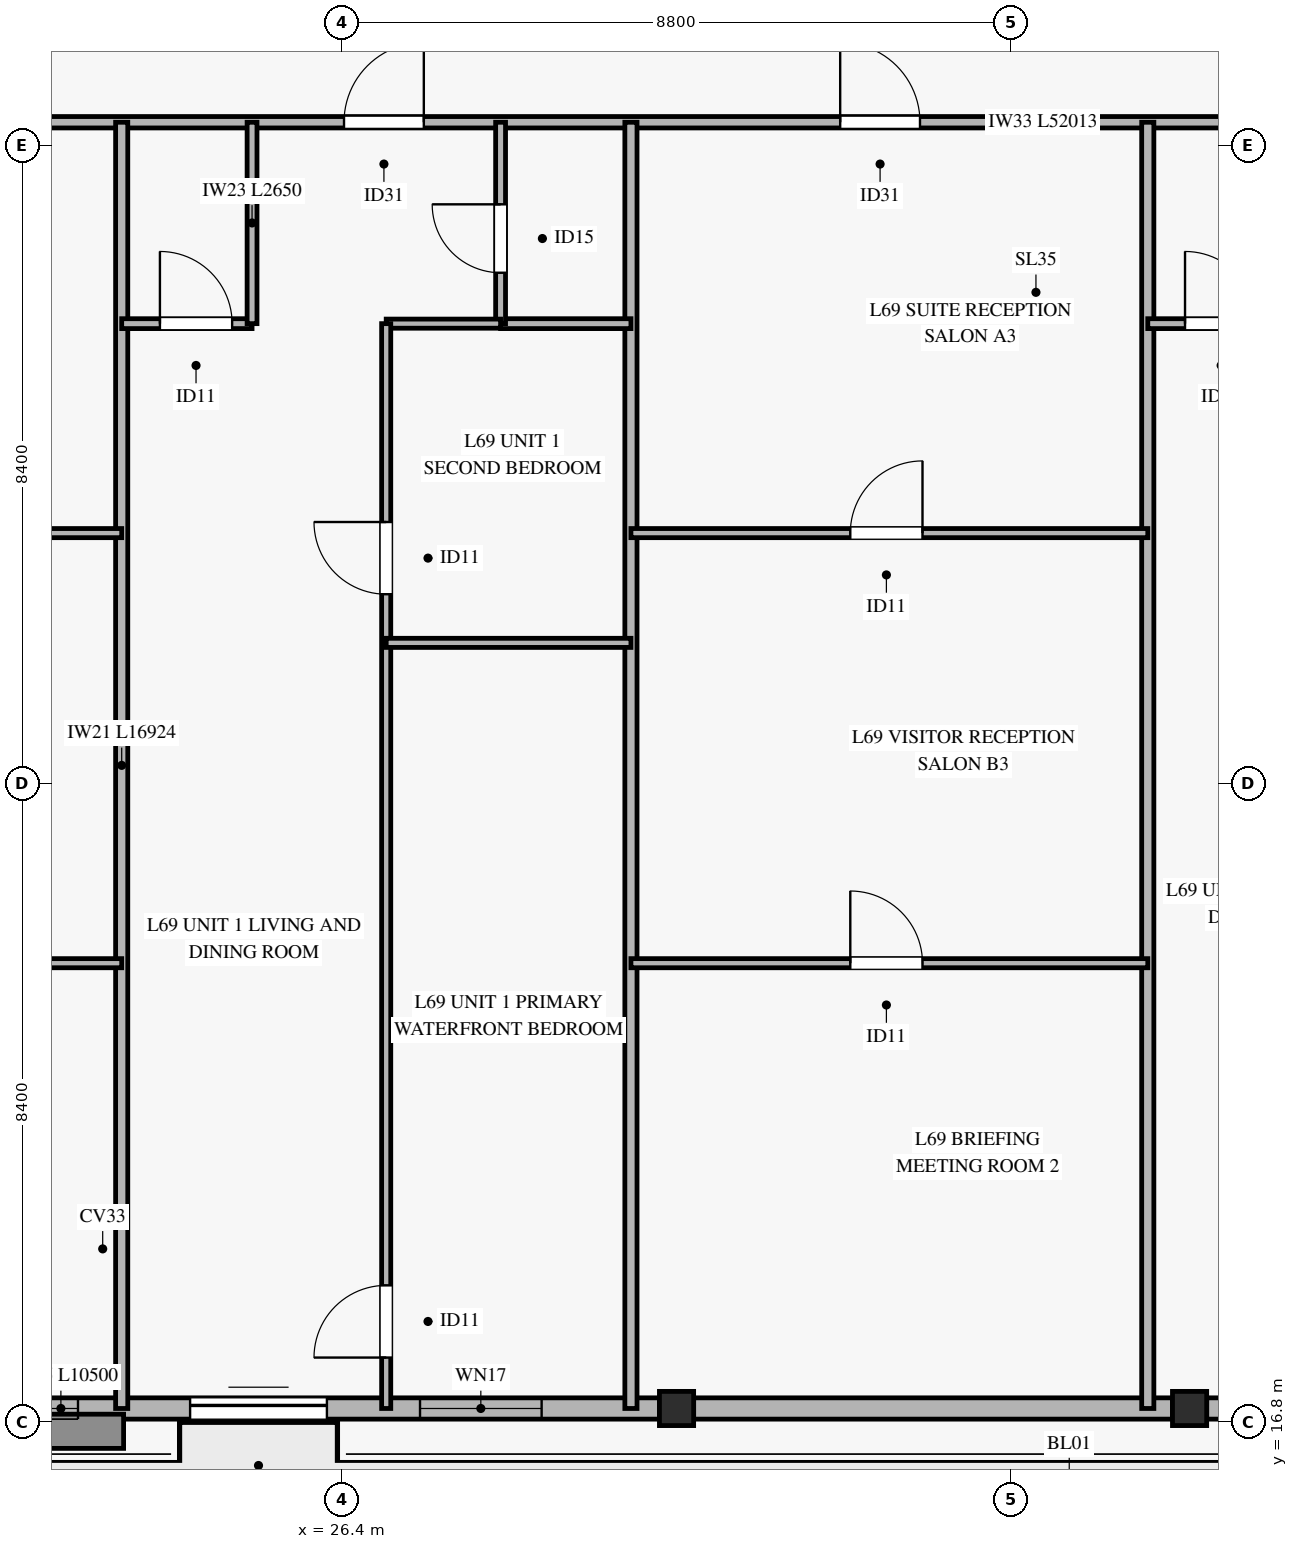
"""IFC4 building model, lengths in metres.
Left out: names, types, materials, properties, quantities, classifications, styles, units other than length and angle.
Written with IfcOpenShell. Run it as: python <this file> out.ifc"""

import sys

from ifc_helpers import new_model, si_unit, direction, frame, frame_2d, origin, origin_2d, place, context, subcontext, project, spatial, rectangle, hollow_rectangle, extrude, source, transform, mapped, element, fill, save


model = new_model("IFC4")
c1 = context("Model", 3, precision=1e-05, world=origin(), true_north=direction((0.0, 1.0)))
c2 = subcontext(c1, "Body", "Model", "MODEL_VIEW")
j1 = project(units=[si_unit("LENGTHUNIT", "METRE"), si_unit("PLANEANGLEUNIT", "RADIAN")], contexts=[c1])
p1 = place(None, origin())
s1 = spatial("IfcSite", under=j1, at=p1, CompositionType="ELEMENT")
p2 = place(p1, origin())
s2 = spatial("IfcBuilding", under=s1, at=p2, CompositionType="ELEMENT")
p3 = place(p2, frame((0.0, 0.0, 268.9)))
s3 = spatial("IfcBuildingStorey", under=s2, at=p3, CompositionType="ELEMENT", Elevation=268.9)
m1 = source(origin(), c2, "Body", "SweptSolid", [
    extrude(hollow_rectangle(XDim=0.45, YDim=0.45, WallThickness=0.022, at=origin_2d()), origin(), (0.0, 0.0, 1.0), 3.185),
])
for number, where, z_axis, x_axis in (
    (1, (30.8, 16.976, 0.0), (0.0, 0.0, 1.0), (1.0, 0.0, 0.0)),
    (2, (37.55, 16.976, 0.0), (0.0, 0.0, 1.0), (1.0, 0.0, 0.0)),
):
    element("IfcColumn", number, at=place(p3, frame(where, z_axis=z_axis, x_axis=x_axis)), inside=s3, PredefinedType="COLUMN", context=c2, shape_type="MappedRepresentation", body=[
        mapped(m1, transform((0.0, 0.0, 0.0), x_axis=(1.0, 0.0, 0.0), y_axis=(0.0, 1.0, 0.0), z_axis=(0.0, 0.0, 1.0), scale=1.0)),
    ])
p4 = place(p3, frame((20.075, 16.976, 0.0), z_axis=(0.0, 0.0, 1.0), x_axis=(1.0, 0.0, 0.0)))
e3 = element("IfcWall", 3, at=p4, inside=s3, PredefinedType="SOLIDWALL", context=c2, shape_type="SweptSolid", body=[
    extrude(rectangle(XDim=10.5, YDim=0.28, at=frame_2d((5.25, 0.0))), origin(), (0.0, 0.0, 1.0), 2.815),
])
p5 = place(p4, frame((4.325, 0.0, 0.0)))
e4 = element("IfcOpeningElement", 4, at=p5, cuts=e3, PredefinedType="OPENING", context=c2, shape_type="SweptSolid", body=[
    extrude(rectangle(XDim=1.8, YDim=2.25, at=frame_2d((0.9, 1.125))), frame((0.0, 0.15, 0.0), z_axis=(0.0, -1.0, 0.0), x_axis=(1.0, 0.0, 0.0)), (0.0, 0.0, 1.0), 0.3),
])
p6 = place(p4, frame((0.65, 0.0, 0.45)))
e5 = element("IfcOpeningElement", 5, at=p6, cuts=e3, PredefinedType="OPENING", context=c2, shape_type="SweptSolid", body=[
    extrude(rectangle(XDim=2.2, YDim=2.1, at=frame_2d((1.1, 1.05))), frame((0.0, 0.15, 0.0), z_axis=(0.0, -1.0, 0.0), x_axis=(1.0, 0.0, 0.0)), (0.0, 0.0, 1.0), 0.3),
])
p7 = place(p4, frame((7.35, 0.0, 0.45)))
e6 = element("IfcOpeningElement", 6, at=p7, cuts=e3, PredefinedType="OPENING", context=c2, shape_type="SweptSolid", body=[
    extrude(rectangle(XDim=1.6, YDim=2.0, at=frame_2d((0.8, 1.0))), frame((0.0, 0.15, 0.0), z_axis=(0.0, -1.0, 0.0), x_axis=(1.0, 0.0, 0.0)), (0.0, 0.0, 1.0), 0.3),
])
for number, where, z_axis, x_axis in (
    (7, (31.025, 16.976, 0.0), (0.0, 0.0, 1.0), (1.0, 0.0, 0.0)),
    (8, (37.775, 16.976, 0.0), (0.0, 0.0, 1.0), (1.0, 0.0, 0.0)),
):
    element("IfcWall", number, at=place(p3, frame(where, z_axis=z_axis, x_axis=x_axis)), inside=s3, PredefinedType="SOLIDWALL", context=c2, shape_type="SweptSolid", body=[
        extrude(rectangle(XDim=6.3, YDim=0.28, at=frame_2d((3.15, 0.0))), origin(), (0.0, 0.0, 1.0), 2.815),
    ])
p8 = place(p3, frame((9.194, 33.9, 0.0), z_axis=(0.0, 0.0, 1.0), x_axis=(1.0, 0.0, 0.0)))
e9 = element("IfcWall", 9, at=p8, inside=s3, PredefinedType="PARTITIONING", context=c2, shape_type="SweptSolid", body=[
    extrude(rectangle(XDim=52.013, YDim=0.15, at=frame_2d((26.006, 0.0))), origin(), (0.0, 0.0, 1.0), 2.47),
])
p9 = place(p8, frame((5.729, 0.0, 0.0)))
e10 = element("IfcOpeningElement", 10, at=p9, cuts=e9, PredefinedType="OPENING", context=c2, shape_type="SweptSolid", body=[
    extrude(rectangle(XDim=1.05, YDim=2.15, at=frame_2d((0.525, 1.075))), frame((0.0, 0.085, 0.0), z_axis=(0.0, -1.0, 0.0), x_axis=(1.0, 0.0, 0.0)), (0.0, 0.0, 1.0), 0.17),
])
p10 = place(p8, frame((17.231, 0.0, 0.0)))
e11 = element("IfcOpeningElement", 11, at=p10, cuts=e9, PredefinedType="OPENING", context=c2, shape_type="SweptSolid", body=[
    extrude(rectangle(XDim=1.05, YDim=2.15, at=frame_2d((0.525, 1.075))), frame((0.0, 0.085, 0.0), z_axis=(0.0, -1.0, 0.0), x_axis=(1.0, 0.0, 0.0)), (0.0, 0.0, 1.0), 0.17),
])
p11 = place(p8, frame((23.759, 0.0, 0.0)))
e12 = element("IfcOpeningElement", 12, at=p11, cuts=e9, PredefinedType="OPENING", context=c2, shape_type="SweptSolid", body=[
    extrude(rectangle(XDim=1.05, YDim=2.15, at=frame_2d((0.525, 1.075))), frame((0.0, 0.085, 0.0), z_axis=(0.0, -1.0, 0.0), x_axis=(1.0, 0.0, 0.0)), (0.0, 0.0, 1.0), 0.17),
])
p12 = place(p8, frame((30.681, 0.0, 0.0)))
e13 = element("IfcOpeningElement", 13, at=p12, cuts=e9, PredefinedType="OPENING", context=c2, shape_type="SweptSolid", body=[
    extrude(rectangle(XDim=1.05, YDim=2.15, at=frame_2d((0.525, 1.075))), frame((0.0, 0.085, 0.0), z_axis=(0.0, -1.0, 0.0), x_axis=(1.0, 0.0, 0.0)), (0.0, 0.0, 1.0), 0.17),
])
p13 = place(p8, frame((36.826, 0.0, 0.0)))
e14 = element("IfcOpeningElement", 14, at=p13, cuts=e9, PredefinedType="OPENING", context=c2, shape_type="SweptSolid", body=[
    extrude(rectangle(XDim=1.05, YDim=2.15, at=frame_2d((0.525, 1.075))), frame((0.0, 0.085, 0.0), z_axis=(0.0, -1.0, 0.0), x_axis=(1.0, 0.0, 0.0)), (0.0, 0.0, 1.0), 0.17),
])
p14 = place(p8, frame((44.786, 0.0, 0.0)))
e15 = element("IfcOpeningElement", 15, at=p14, cuts=e9, PredefinedType="OPENING", context=c2, shape_type="SweptSolid", body=[
    extrude(rectangle(XDim=1.05, YDim=2.15, at=frame_2d((0.525, 1.075))), frame((0.0, 0.085, 0.0), z_axis=(0.0, -1.0, 0.0), x_axis=(1.0, 0.0, 0.0)), (0.0, 0.0, 1.0), 0.17),
])
for number, where, z_axis, x_axis in (
    (16, (23.5, 16.976, 0.0), (0.0, 0.0, 1.0), (0.0, 1.0, 0.0)),
    (17, (30.2, 16.976, 0.0), (0.0, 0.0, 1.0), (0.0, 1.0, 0.0)),
    (18, (37.0, 16.976, 0.0), (0.0, 0.0, 1.0), (0.0, 1.0, 0.0)),
):
    element("IfcWall", number, at=place(p3, frame(where, z_axis=z_axis, x_axis=x_axis)), inside=s3, PredefinedType="PARTITIONING", context=c2, shape_type="SweptSolid", body=[
        extrude(rectangle(XDim=16.924, YDim=0.16, at=frame_2d((8.462, 0.0))), origin(), (0.0, 0.0, 1.0), 2.77),
    ])
p15 = place(p3, frame((9.194, 22.835, 0.0), z_axis=(0.0, 0.0, 1.0), x_axis=(1.0, 0.0, 0.0)))
e19 = element("IfcWall", 19, at=p15, inside=s3, PredefinedType="PARTITIONING", context=c2, shape_type="SweptSolid", body=[
    extrude(rectangle(XDim=14.306, YDim=0.12, at=frame_2d((7.153, 0.0))), origin(), (0.0, 0.0, 1.0), 2.47),
])
p16 = place(p15, frame((6.008, 0.0, 0.0)))
e20 = element("IfcOpeningElement", 20, at=p16, cuts=e19, PredefinedType="OPENING", context=c2, shape_type="SweptSolid", body=[
    extrude(rectangle(XDim=0.95, YDim=2.1, at=frame_2d((0.475, 1.05))), frame((0.0, 0.07, 0.0), z_axis=(0.0, -1.0, 0.0), x_axis=(1.0, 0.0, 0.0)), (0.0, 0.0, 1.0), 0.14),
])
p17 = place(p3, frame((9.194, 28.494, 0.0), z_axis=(0.0, 0.0, 1.0), x_axis=(1.0, 0.0, 0.0)))
e21 = element("IfcWall", 21, at=p17, inside=s3, PredefinedType="PARTITIONING", context=c2, shape_type="SweptSolid", body=[
    extrude(rectangle(XDim=14.306, YDim=0.12, at=frame_2d((7.153, 0.0))), origin(), (0.0, 0.0, 1.0), 2.47),
])
p18 = place(p17, frame((6.008, 0.0, 0.0)))
e22 = element("IfcOpeningElement", 22, at=p18, cuts=e21, PredefinedType="OPENING", context=c2, shape_type="SweptSolid", body=[
    extrude(rectangle(XDim=0.95, YDim=2.1, at=frame_2d((0.475, 1.05))), frame((0.0, 0.07, 0.0), z_axis=(0.0, -1.0, 0.0), x_axis=(1.0, 0.0, 0.0)), (0.0, 0.0, 1.0), 0.14),
])
p19 = place(p3, frame((23.5, 31.25, 0.0), z_axis=(0.0, 0.0, 1.0), x_axis=(1.0, 0.0, 0.0)))
e23 = element("IfcWall", 23, at=p19, inside=s3, PredefinedType="PARTITIONING", context=c2, shape_type="SweptSolid", body=[
    extrude(rectangle(XDim=1.715, YDim=0.13, at=frame_2d((0.857, 0.0))), origin(), (0.0, 0.0, 1.0), 3.185),
])
p20 = place(p19, frame((0.503, 0.0, 0.0)))
e24 = element("IfcOpeningElement", 24, at=p20, cuts=e23, PredefinedType="OPENING", context=c2, shape_type="SweptSolid", body=[
    extrude(rectangle(XDim=0.95, YDim=2.1, at=frame_2d((0.475, 1.05))), frame((0.0, 0.075, 0.0), z_axis=(0.0, -1.0, 0.0), x_axis=(1.0, 0.0, 0.0)), (0.0, 0.0, 1.0), 0.15),
])
p21 = place(p3, frame((25.215, 31.25, 0.0), z_axis=(0.0, 0.0, 1.0), x_axis=(0.0, 1.0, 0.0)))
e25 = element("IfcWall", 25, at=p21, inside=s3, PredefinedType="PARTITIONING", context=c2, shape_type="SweptSolid", body=[
    extrude(rectangle(XDim=2.65, YDim=0.13, at=frame_2d((1.325, 0.0))), origin(), (0.0, 0.0, 1.0), 2.77),
])
p22 = place(p3, frame((28.485, 31.25, 0.0), z_axis=(0.0, 0.0, 1.0), x_axis=(1.0, 0.0, 0.0)))
e26 = element("IfcWall", 26, at=p22, inside=s3, PredefinedType="PARTITIONING", context=c2, shape_type="SweptSolid", body=[
    extrude(rectangle(XDim=1.715, YDim=0.13, at=frame_2d((0.857, 0.0))), origin(), (0.0, 0.0, 1.0), 3.185),
])
p23 = place(p3, frame((28.485, 31.25, 0.0), z_axis=(0.0, 0.0, 1.0), x_axis=(0.0, 1.0, 0.0)))
e27 = element("IfcWall", 27, at=p23, inside=s3, PredefinedType="PARTITIONING", context=c2, shape_type="SweptSolid", body=[
    extrude(rectangle(XDim=2.65, YDim=0.13, at=frame_2d((1.325, 0.0))), origin(), (0.0, 0.0, 1.0), 2.77),
])
p24 = place(p23, frame((0.67, 0.0, 0.0)))
e28 = element("IfcOpeningElement", 28, at=p24, cuts=e27, PredefinedType="OPENING", context=c2, shape_type="SweptSolid", body=[
    extrude(rectangle(XDim=0.9, YDim=2.1, at=frame_2d((0.45, 1.05))), frame((0.0, 0.075, 0.0), z_axis=(0.0, -1.0, 0.0), x_axis=(1.0, 0.0, 0.0)), (0.0, 0.0, 1.0), 0.15),
])
p25 = place(p3, frame((26.98, 31.25, 0.0), z_axis=(0.0, 0.0, 1.0), x_axis=(1.0, 0.0, 0.0)))
e29 = element("IfcWall", 29, at=p25, inside=s3, PredefinedType="PARTITIONING", context=c2, shape_type="SweptSolid", body=[
    extrude(rectangle(XDim=1.505, YDim=0.12, at=frame_2d((0.752, 0.0))), origin(), (0.0, 0.0, 1.0), 3.185),
])
p26 = place(p3, frame((26.98, 16.976, 0.0), z_axis=(0.0, 0.0, 1.0), x_axis=(0.0, 1.0, 0.0)))
e30 = element("IfcWall", 30, at=p26, inside=s3, PredefinedType="PARTITIONING", context=c2, shape_type="SweptSolid", body=[
    extrude(rectangle(XDim=14.274, YDim=0.12, at=frame_2d((7.137, 0.0))), origin(), (0.0, 0.0, 1.0), 2.77),
])
p27 = place(p26, frame((0.67, 0.0, 0.0)))
e31 = element("IfcOpeningElement", 31, at=p27, cuts=e30, PredefinedType="OPENING", context=c2, shape_type="SweptSolid", body=[
    extrude(rectangle(XDim=0.95, YDim=2.1, at=frame_2d((0.475, 1.05))), frame((0.0, 0.07, 0.0), z_axis=(0.0, -1.0, 0.0), x_axis=(1.0, 0.0, 0.0)), (0.0, 0.0, 1.0), 0.14),
])
p28 = place(p26, frame((10.714, 0.0, 0.0)))
e32 = element("IfcOpeningElement", 32, at=p28, cuts=e30, PredefinedType="OPENING", context=c2, shape_type="SweptSolid", body=[
    extrude(rectangle(XDim=0.95, YDim=2.1, at=frame_2d((0.475, 1.05))), frame((0.0, 0.07, 0.0), z_axis=(0.0, -1.0, 0.0), x_axis=(1.0, 0.0, 0.0)), (0.0, 0.0, 1.0), 0.14),
])
p29 = place(p3, frame((26.98, 27.05, 0.0), z_axis=(0.0, 0.0, 1.0), x_axis=(1.0, 0.0, 0.0)))
e33 = element("IfcWall", 33, at=p29, inside=s3, PredefinedType="PARTITIONING", context=c2, shape_type="SweptSolid", body=[
    extrude(rectangle(XDim=3.22, YDim=0.12, at=frame_2d((1.61, 0.0))), origin(), (0.0, 0.0, 1.0), 2.77),
])
p30 = place(p3, frame((30.2, 22.835, 0.0), z_axis=(0.0, 0.0, 1.0), x_axis=(1.0, 0.0, 0.0)))
e34 = element("IfcWall", 34, at=p30, inside=s3, PredefinedType="PARTITIONING", context=c2, shape_type="SweptSolid", body=[
    extrude(rectangle(XDim=6.8, YDim=0.12, at=frame_2d((3.4, 0.0))), origin(), (0.0, 0.0, 1.0), 2.47),
])
p31 = place(p30, frame((2.886, 0.0, 0.0)))
e35 = element("IfcOpeningElement", 35, at=p31, cuts=e34, PredefinedType="OPENING", context=c2, shape_type="SweptSolid", body=[
    extrude(rectangle(XDim=0.95, YDim=2.1, at=frame_2d((0.475, 1.05))), frame((0.0, 0.07, 0.0), z_axis=(0.0, -1.0, 0.0), x_axis=(1.0, 0.0, 0.0)), (0.0, 0.0, 1.0), 0.14),
])
p32 = place(p3, frame((30.2, 28.494, 0.0), z_axis=(0.0, 0.0, 1.0), x_axis=(1.0, 0.0, 0.0)))
e36 = element("IfcWall", 36, at=p32, inside=s3, PredefinedType="PARTITIONING", context=c2, shape_type="SweptSolid", body=[
    extrude(rectangle(XDim=6.8, YDim=0.12, at=frame_2d((3.4, 0.0))), origin(), (0.0, 0.0, 1.0), 2.47),
])
p33 = place(p32, frame((2.886, 0.0, 0.0)))
e37 = element("IfcOpeningElement", 37, at=p33, cuts=e36, PredefinedType="OPENING", context=c2, shape_type="SweptSolid", body=[
    extrude(rectangle(XDim=0.95, YDim=2.1, at=frame_2d((0.475, 1.05))), frame((0.0, 0.07, 0.0), z_axis=(0.0, -1.0, 0.0), x_axis=(1.0, 0.0, 0.0)), (0.0, 0.0, 1.0), 0.14),
])
p34 = place(p3, frame((37.0, 31.25, 0.0), z_axis=(0.0, 0.0, 1.0), x_axis=(1.0, 0.0, 0.0)))
e38 = element("IfcWall", 38, at=p34, inside=s3, PredefinedType="PARTITIONING", context=c2, shape_type="SweptSolid", body=[
    extrude(rectangle(XDim=1.69, YDim=0.13, at=frame_2d((0.845, 0.0))), origin(), (0.0, 0.0, 1.0), 2.47),
])
p35 = place(p34, frame((0.49, 0.0, 0.0)))
e39 = element("IfcOpeningElement", 39, at=p35, cuts=e38, PredefinedType="OPENING", context=c2, shape_type="SweptSolid", body=[
    extrude(rectangle(XDim=0.95, YDim=2.1, at=frame_2d((0.475, 1.05))), frame((0.0, 0.075, 0.0), z_axis=(0.0, -1.0, 0.0), x_axis=(1.0, 0.0, 0.0)), (0.0, 0.0, 1.0), 0.15),
])
m2 = source(origin(), c2, "Body", "SweptSolid", [
    extrude(rectangle(XDim=1.8, YDim=2.25, at=frame_2d((0.9, 1.125))), frame((0.0, 0.025, 0.0), z_axis=(0.0, -1.0, 0.0), x_axis=(1.0, 0.0, 0.0)), (0.0, 0.0, 1.0), 0.05),
])
p36 = place(p5, origin())
e40 = element("IfcDoor", 40, at=p36, inside=s3, OperationType="SLIDING_TO_LEFT", PredefinedType="DOOR", context=c2, shape_type="MappedRepresentation", body=[
    mapped(m2, transform((0.0, 0.0, 0.0), x_axis=(1.0, 0.0, 0.0), y_axis=(0.0, 1.0, 0.0), z_axis=(0.0, 0.0, 1.0), scale=1.0)),
])
fill(e4, e40)
m3 = source(origin(), c2, "Body", "SweptSolid", [
    extrude(rectangle(XDim=2.2, YDim=2.1, at=frame_2d((1.1, 1.05))), frame((0.0, 0.03, 0.0), z_axis=(0.0, -1.0, 0.0), x_axis=(1.0, 0.0, 0.0)), (0.0, 0.0, 1.0), 0.06),
])
p37 = place(p6, origin())
e41 = element("IfcWindow", 41, at=p37, inside=s3, PartitioningType="SINGLE_PANEL", PredefinedType="WINDOW", context=c2, shape_type="MappedRepresentation", body=[
    mapped(m3, transform((0.0, 0.0, 0.0), x_axis=(1.0, 0.0, 0.0), y_axis=(0.0, 1.0, 0.0), z_axis=(0.0, 0.0, 1.0), scale=1.0)),
])
fill(e5, e41)
m4 = source(origin(), c2, "Body", "SweptSolid", [
    extrude(rectangle(XDim=1.6, YDim=2.0, at=frame_2d((0.8, 1.0))), frame((0.0, 0.03, 0.0), z_axis=(0.0, -1.0, 0.0), x_axis=(1.0, 0.0, 0.0)), (0.0, 0.0, 1.0), 0.06),
])
p38 = place(p7, origin())
e42 = element("IfcWindow", 42, at=p38, inside=s3, PartitioningType="SINGLE_PANEL", PredefinedType="WINDOW", context=c2, shape_type="MappedRepresentation", body=[
    mapped(m4, transform((0.0, 0.0, 0.0), x_axis=(1.0, 0.0, 0.0), y_axis=(0.0, 1.0, 0.0), z_axis=(0.0, 0.0, 1.0), scale=1.0)),
])
fill(e6, e42)
m5 = source(origin(), c2, "Body", "SweptSolid", [
    extrude(rectangle(XDim=1.05, YDim=2.15, at=frame_2d((0.525, 1.075))), frame((0.0, 0.025, 0.0), z_axis=(0.0, -1.0, 0.0), x_axis=(1.0, 0.0, 0.0)), (0.0, 0.0, 1.0), 0.05),
])
p39 = place(p10, origin())
e43 = element("IfcDoor", 43, at=p39, inside=s3, OperationType="SINGLE_SWING_RIGHT", PredefinedType="DOOR", context=c2, shape_type="MappedRepresentation", body=[
    mapped(m5, transform((0.0, 0.0, 0.0), x_axis=(1.0, 0.0, 0.0), y_axis=(0.0, 1.0, 0.0), z_axis=(0.0, 0.0, 1.0), scale=1.0)),
])
fill(e11, e43)
m6 = source(origin(), c2, "Body", "SweptSolid", [
    extrude(rectangle(XDim=0.95, YDim=2.1, at=frame_2d((0.475, 1.05))), frame((0.0, 0.025, 0.0), z_axis=(0.0, -1.0, 0.0), x_axis=(1.0, 0.0, 0.0)), (0.0, 0.0, 1.0), 0.05),
])
p40 = place(p20, origin())
e44 = element("IfcDoor", 44, at=p40, inside=s3, OperationType="SINGLE_SWING_LEFT", PredefinedType="DOOR", context=c2, shape_type="MappedRepresentation", body=[
    mapped(m6, transform((0.0, 0.0, 0.0), x_axis=(1.0, 0.0, 0.0), y_axis=(0.0, 1.0, 0.0), z_axis=(0.0, 0.0, 1.0), scale=1.0)),
])
fill(e24, e44)
m7 = source(origin(), c2, "Body", "SweptSolid", [
    extrude(rectangle(XDim=0.9, YDim=2.1, at=frame_2d((0.45, 1.05))), frame((0.0, 0.025, 0.0), z_axis=(0.0, -1.0, 0.0), x_axis=(1.0, 0.0, 0.0)), (0.0, 0.0, 1.0), 0.05),
])
p41 = place(p24, origin())
e45 = element("IfcDoor", 45, at=p41, inside=s3, OperationType="SINGLE_SWING_RIGHT", PredefinedType="DOOR", context=c2, shape_type="MappedRepresentation", body=[
    mapped(m7, transform((0.0, 0.0, 0.0), x_axis=(1.0, 0.0, 0.0), y_axis=(0.0, 1.0, 0.0), z_axis=(0.0, 0.0, 1.0), scale=1.0)),
])
fill(e28, e45)
p42 = place(p27, origin())
e46 = element("IfcDoor", 46, at=p42, inside=s3, OperationType="SINGLE_SWING_LEFT", PredefinedType="DOOR", context=c2, shape_type="MappedRepresentation", body=[
    mapped(m6, transform((0.0, 0.0, 0.0), x_axis=(1.0, 0.0, 0.0), y_axis=(0.0, 1.0, 0.0), z_axis=(0.0, 0.0, 1.0), scale=1.0)),
])
fill(e31, e46)
p43 = place(p28, origin())
e47 = element("IfcDoor", 47, at=p43, inside=s3, OperationType="SINGLE_SWING_RIGHT", PredefinedType="DOOR", context=c2, shape_type="MappedRepresentation", body=[
    mapped(m6, transform((0.0, 0.0, 0.0), x_axis=(1.0, 0.0, 0.0), y_axis=(0.0, 1.0, 0.0), z_axis=(0.0, 0.0, 1.0), scale=1.0)),
])
fill(e32, e47)
p44 = place(p11, origin())
e48 = element("IfcDoor", 48, at=p44, inside=s3, OperationType="SINGLE_SWING_LEFT", PredefinedType="DOOR", context=c2, shape_type="MappedRepresentation", body=[
    mapped(m5, transform((0.0, 0.0, 0.0), x_axis=(1.0, 0.0, 0.0), y_axis=(0.0, 1.0, 0.0), z_axis=(0.0, 0.0, 1.0), scale=1.0)),
])
fill(e12, e48)
p45 = place(p33, origin())
e49 = element("IfcDoor", 49, at=p45, inside=s3, OperationType="SINGLE_SWING_RIGHT", PredefinedType="DOOR", context=c2, shape_type="MappedRepresentation", body=[
    mapped(m6, transform((0.0, 0.0, 0.0), x_axis=(1.0, 0.0, 0.0), y_axis=(0.0, 1.0, 0.0), z_axis=(0.0, 0.0, 1.0), scale=1.0)),
])
fill(e37, e49)
p46 = place(p31, origin())
e50 = element("IfcDoor", 50, at=p46, inside=s3, OperationType="SINGLE_SWING_LEFT", PredefinedType="DOOR", context=c2, shape_type="MappedRepresentation", body=[
    mapped(m6, transform((0.0, 0.0, 0.0), x_axis=(1.0, 0.0, 0.0), y_axis=(0.0, 1.0, 0.0), z_axis=(0.0, 0.0, 1.0), scale=1.0)),
])
fill(e35, e50)
p47 = place(p35, origin())
e51 = element("IfcDoor", 51, at=p47, inside=s3, OperationType="SINGLE_SWING_LEFT", PredefinedType="DOOR", context=c2, shape_type="MappedRepresentation", body=[
    mapped(m6, transform((0.0, 0.0, 0.0), x_axis=(1.0, 0.0, 0.0), y_axis=(0.0, 1.0, 0.0), z_axis=(0.0, 0.0, 1.0), scale=1.0)),
])
fill(e39, e51)
save(model, sys.argv[1])
